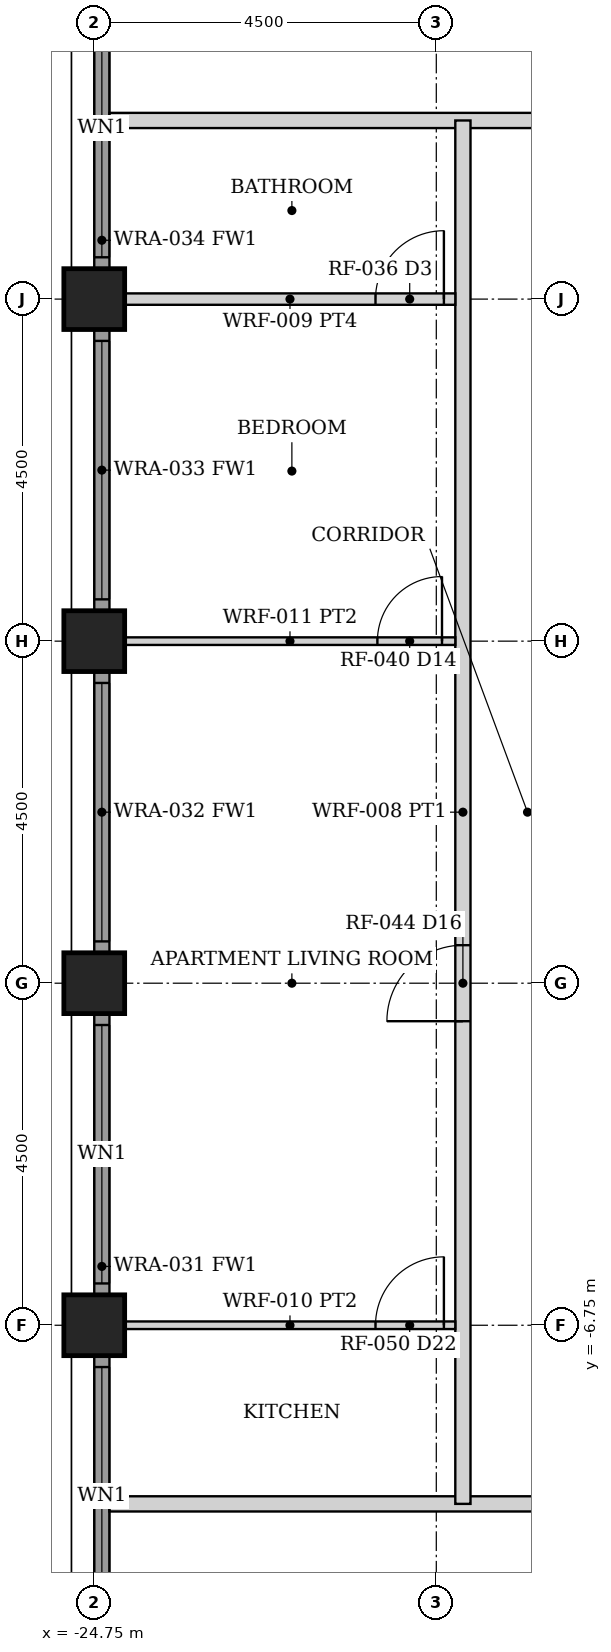
"""IFC4 building model, lengths in metres.
Left out: names, types, materials, properties, quantities, classifications, styles, units other than length and angle.
Written with IfcOpenShell. Run it as: python <this file> out.ifc"""

import sys

from ifc_helpers import new_model, si_unit, direction, frame, frame_2d, origin, origin_2d, place, context, subcontext, project, spatial, rectangle, hollow_rectangle, extrude, element, fill, save


model = new_model("IFC4")
c1 = context("Model", 3, precision=1e-05, world=origin(), true_north=direction((0.0, 1.0)))
c2 = subcontext(c1, "Body", "Model", "MODEL_VIEW")
j1 = project(units=[si_unit("LENGTHUNIT", "METRE"), si_unit("PLANEANGLEUNIT", "RADIAN")], contexts=[c1])
p1 = place(None, origin())
s1 = spatial("IfcSite", under=j1, at=p1, CompositionType="ELEMENT")
p2 = place(p1, origin())
s2 = spatial("IfcBuilding", under=s1, at=p2, CompositionType="ELEMENT")
p3 = place(p2, frame((0.0, 0.0, 79.0)))
s3 = spatial("IfcBuildingStorey", under=s2, at=p3, CompositionType="ELEMENT", Elevation=79.0)
for number, where, z_axis, x_axis in (
    (1, (-24.75, -6.75, 0.0), (0.0, 0.0, 1.0), (1.0, 0.0, 0.0)),
    (2, (-24.75, -2.25, 0.0), (0.0, 0.0, 1.0), (1.0, 0.0, 0.0)),
    (3, (-24.75, 2.25, 0.0), (0.0, 0.0, 1.0), (1.0, 0.0, 0.0)),
    (4, (-24.75, 6.75, 0.0), (0.0, 0.0, 1.0), (1.0, 0.0, 0.0)),
):
    element("IfcColumn", number, at=place(p3, frame(where, z_axis=z_axis, x_axis=x_axis)), inside=s3, PredefinedType="COLUMN", context=c2, shape_type="SweptSolid", body=[
        extrude(hollow_rectangle(XDim=0.8, YDim=0.8, WallThickness=0.06, at=origin_2d()), origin(), (0.0, 0.0, 1.0), 3.5),
    ])
p4 = place(p3, frame((-24.65, -10.845, 0.0), z_axis=(0.0, 0.0, 1.0), x_axis=(0.0, 1.0, 0.0)))
e5 = element("IfcWall", 5, at=p4, inside=s3, PredefinedType="SOLIDWALL", context=c2, shape_type="SweptSolid", body=[
    extrude(rectangle(XDim=3.69, YDim=0.2, at=frame_2d((1.845, 0.0))), origin(), (0.0, 0.0, 1.0), 2.379),
])
p5 = place(p4, frame((0.145, 0.0, 0.3)))
e6 = element("IfcOpeningElement", 6, at=p5, cuts=e5, PredefinedType="OPENING", context=c2, shape_type="SweptSolid", body=[
    extrude(rectangle(XDim=3.4, YDim=1.929, at=frame_2d((1.7, 0.964))), frame((0.0, 0.11, 0.0), z_axis=(0.0, -1.0, 0.0), x_axis=(1.0, 0.0, 0.0)), (0.0, 0.0, 1.0), 0.22),
])
p6 = place(p3, frame((-24.65, -6.345, 0.0), z_axis=(0.0, 0.0, 1.0), x_axis=(0.0, 1.0, 0.0)))
e7 = element("IfcWall", 7, at=p6, inside=s3, PredefinedType="SOLIDWALL", context=c2, shape_type="SweptSolid", body=[
    extrude(rectangle(XDim=3.69, YDim=0.2, at=frame_2d((1.845, 0.0))), origin(), (0.0, 0.0, 1.0), 2.379),
])
p7 = place(p6, frame((0.145, 0.0, 0.3)))
e8 = element("IfcOpeningElement", 8, at=p7, cuts=e7, PredefinedType="OPENING", context=c2, shape_type="SweptSolid", body=[
    extrude(rectangle(XDim=3.4, YDim=1.929, at=frame_2d((1.7, 0.964))), frame((0.0, 0.11, 0.0), z_axis=(0.0, -1.0, 0.0), x_axis=(1.0, 0.0, 0.0)), (0.0, 0.0, 1.0), 0.22),
])
p8 = place(p3, frame((-24.65, -1.845, 0.0), z_axis=(0.0, 0.0, 1.0), x_axis=(0.0, 1.0, 0.0)))
e9 = element("IfcWall", 9, at=p8, inside=s3, PredefinedType="SOLIDWALL", context=c2, shape_type="SweptSolid", body=[
    extrude(rectangle(XDim=3.69, YDim=0.2, at=frame_2d((1.845, 0.0))), origin(), (0.0, 0.0, 1.0), 2.379),
])
p9 = place(p8, frame((0.145, 0.0, 0.3)))
e10 = element("IfcOpeningElement", 10, at=p9, cuts=e9, PredefinedType="OPENING", context=c2, shape_type="SweptSolid", body=[
    extrude(rectangle(XDim=3.4, YDim=1.929, at=frame_2d((1.7, 0.964))), frame((0.0, 0.11, 0.0), z_axis=(0.0, -1.0, 0.0), x_axis=(1.0, 0.0, 0.0)), (0.0, 0.0, 1.0), 0.22),
])
p10 = place(p3, frame((-24.65, 2.655, 0.0), z_axis=(0.0, 0.0, 1.0), x_axis=(0.0, 1.0, 0.0)))
e11 = element("IfcWall", 11, at=p10, inside=s3, PredefinedType="SOLIDWALL", context=c2, shape_type="SweptSolid", body=[
    extrude(rectangle(XDim=3.69, YDim=0.2, at=frame_2d((1.845, 0.0))), origin(), (0.0, 0.0, 1.0), 2.379),
])
p11 = place(p10, frame((0.145, 0.0, 0.3)))
e12 = element("IfcOpeningElement", 12, at=p11, cuts=e11, PredefinedType="OPENING", context=c2, shape_type="SweptSolid", body=[
    extrude(rectangle(XDim=3.4, YDim=1.929, at=frame_2d((1.7, 0.964))), frame((0.0, 0.11, 0.0), z_axis=(0.0, -1.0, 0.0), x_axis=(1.0, 0.0, 0.0)), (0.0, 0.0, 1.0), 0.22),
])
p12 = place(p3, frame((-24.65, 7.155, 0.0), z_axis=(0.0, 0.0, 1.0), x_axis=(0.0, 1.0, 0.0)))
e13 = element("IfcWall", 13, at=p12, inside=s3, PredefinedType="SOLIDWALL", context=c2, shape_type="SweptSolid", body=[
    extrude(rectangle(XDim=3.69, YDim=0.2, at=frame_2d((1.845, 0.0))), origin(), (0.0, 0.0, 1.0), 2.379),
])
p13 = place(p12, frame((0.145, 0.0, 0.3)))
e14 = element("IfcOpeningElement", 14, at=p13, cuts=e13, PredefinedType="OPENING", context=c2, shape_type="SweptSolid", body=[
    extrude(rectangle(XDim=3.4, YDim=1.929, at=frame_2d((1.7, 0.964))), frame((0.0, 0.11, 0.0), z_axis=(0.0, -1.0, 0.0), x_axis=(1.0, 0.0, 0.0)), (0.0, 0.0, 1.0), 0.22),
])
p14 = place(p3, frame((-24.55, 9.1, 0.0), z_axis=(0.0, 0.0, 1.0), x_axis=(1.0, 0.0, 0.0)))
e15 = element("IfcWall", 15, at=p14, inside=s3, PredefinedType="PARTITIONING", context=c2, shape_type="SweptSolid", body=[
    extrude(rectangle(XDim=49.1, YDim=0.2, at=frame_2d((24.55, 0.0))), origin(), (0.0, 0.0, 1.0), 2.373),
])
p15 = place(p14, frame((22.55, 0.0, 0.0)))
e16 = element("IfcOpeningElement", 16, at=p15, cuts=e15, PredefinedType="OPENING", context=c2, shape_type="SweptSolid", body=[
    extrude(rectangle(XDim=1.0, YDim=2.3, at=frame_2d((0.5, 1.15))), frame((0.0, 0.11, 0.0), z_axis=(0.0, -1.0, 0.0), x_axis=(1.0, 0.0, 0.0)), (0.0, 0.0, 1.0), 0.22),
])
p16 = place(p14, frame((21.05, 0.0, 0.0)))
e17 = element("IfcOpeningElement", 17, at=p16, cuts=e15, PredefinedType="OPENING", context=c2, shape_type="SweptSolid", body=[
    extrude(rectangle(XDim=1.0, YDim=2.3, at=frame_2d((0.5, 1.15))), frame((0.0, 0.11, 0.0), z_axis=(0.0, -1.0, 0.0), x_axis=(1.0, 0.0, 0.0)), (0.0, 0.0, 1.0), 0.22),
])
p17 = place(p3, frame((-24.55, -9.1, 0.0), z_axis=(0.0, 0.0, 1.0), x_axis=(1.0, 0.0, 0.0)))
e18 = element("IfcWall", 18, at=p17, inside=s3, PredefinedType="PARTITIONING", context=c2, shape_type="SweptSolid", body=[
    extrude(rectangle(XDim=49.1, YDim=0.2, at=frame_2d((24.55, 0.0))), origin(), (0.0, 0.0, 1.0), 2.373),
])
p18 = place(p17, frame((25.55, 0.0, 0.0)))
e19 = element("IfcOpeningElement", 19, at=p18, cuts=e18, PredefinedType="OPENING", context=c2, shape_type="SweptSolid", body=[
    extrude(rectangle(XDim=1.0, YDim=2.3, at=frame_2d((0.5, 1.15))), frame((0.0, 0.11, 0.0), z_axis=(0.0, -1.0, 0.0), x_axis=(1.0, 0.0, 0.0)), (0.0, 0.0, 1.0), 0.22),
])
p19 = place(p17, frame((27.05, 0.0, 0.0)))
e20 = element("IfcOpeningElement", 20, at=p19, cuts=e18, PredefinedType="OPENING", context=c2, shape_type="SweptSolid", body=[
    extrude(rectangle(XDim=1.0, YDim=2.3, at=frame_2d((0.5, 1.15))), frame((0.0, 0.11, 0.0), z_axis=(0.0, -1.0, 0.0), x_axis=(1.0, 0.0, 0.0)), (0.0, 0.0, 1.0), 0.22),
])
p20 = place(p3, frame((-19.9, -9.1, 0.0), z_axis=(0.0, 0.0, 1.0), x_axis=(0.0, 1.0, 0.0)))
e21 = element("IfcWall", 21, at=p20, inside=s3, PredefinedType="PARTITIONING", context=c2, shape_type="SweptSolid", body=[
    extrude(rectangle(XDim=18.2, YDim=0.2, at=frame_2d((9.1, 0.0))), origin(), (0.0, 0.0, 1.0), 2.373),
])
p21 = place(p20, frame((6.35, 0.0, 0.0)))
e22 = element("IfcOpeningElement", 22, at=p21, cuts=e21, PredefinedType="OPENING", context=c2, shape_type="SweptSolid", body=[
    extrude(rectangle(XDim=1.0, YDim=2.3, at=frame_2d((0.5, 1.15))), frame((0.0, 0.11, 0.0), z_axis=(0.0, -1.0, 0.0), x_axis=(1.0, 0.0, 0.0)), (0.0, 0.0, 1.0), 0.22),
])
p22 = place(p3, frame((-24.35, -6.75, 0.0), z_axis=(0.0, 0.0, 1.0), x_axis=(1.0, 0.0, 0.0)))
e23 = element("IfcWall", 23, at=p22, inside=s3, PredefinedType="PARTITIONING", context=c2, shape_type="SweptSolid", body=[
    extrude(rectangle(XDim=4.35, YDim=0.1, at=frame_2d((2.175, 0.0))), origin(), (0.0, 0.0, 1.0), 2.373),
])
p23 = place(p22, frame((3.3, 0.0, 0.0)))
e24 = element("IfcOpeningElement", 24, at=p23, cuts=e23, PredefinedType="OPENING", context=c2, shape_type="SweptSolid", body=[
    extrude(rectangle(XDim=0.9, YDim=2.1, at=frame_2d((0.45, 1.05))), frame((0.0, 0.06, 0.0), z_axis=(0.0, -1.0, 0.0), x_axis=(1.0, 0.0, 0.0)), (0.0, 0.0, 1.0), 0.12),
])
p24 = place(p3, frame((-24.35, 2.25, 0.0), z_axis=(0.0, 0.0, 1.0), x_axis=(1.0, 0.0, 0.0)))
e25 = element("IfcWall", 25, at=p24, inside=s3, PredefinedType="PARTITIONING", context=c2, shape_type="SweptSolid", body=[
    extrude(rectangle(XDim=4.35, YDim=0.1, at=frame_2d((2.175, 0.0))), origin(), (0.0, 0.0, 1.0), 2.373),
])
p25 = place(p24, frame((3.325, 0.0, 0.0)))
e26 = element("IfcOpeningElement", 26, at=p25, cuts=e25, PredefinedType="OPENING", context=c2, shape_type="SweptSolid", body=[
    extrude(rectangle(XDim=0.85, YDim=2.1, at=frame_2d((0.425, 1.05))), frame((0.0, 0.06, 0.0), z_axis=(0.0, -1.0, 0.0), x_axis=(1.0, 0.0, 0.0)), (0.0, 0.0, 1.0), 0.12),
])
p26 = place(p3, frame((-24.35, 6.75, 0.0), z_axis=(0.0, 0.0, 1.0), x_axis=(1.0, 0.0, 0.0)))
e27 = element("IfcWall", 27, at=p26, inside=s3, PredefinedType="PARTITIONING", context=c2, shape_type="SweptSolid", body=[
    extrude(rectangle(XDim=4.35, YDim=0.15, at=frame_2d((2.175, 0.0))), origin(), (0.0, 0.0, 1.0), 2.373),
])
p27 = place(p26, frame((3.3, 0.0, 0.0)))
e28 = element("IfcOpeningElement", 28, at=p27, cuts=e27, PredefinedType="OPENING", context=c2, shape_type="SweptSolid", body=[
    extrude(rectangle(XDim=0.9, YDim=2.1, at=frame_2d((0.45, 1.05))), frame((0.0, 0.085, 0.0), z_axis=(0.0, -1.0, 0.0), x_axis=(1.0, 0.0, 0.0)), (0.0, 0.0, 1.0), 0.17),
])
p28 = place(p5, origin())
e29 = element("IfcWindow", 29, at=p28, inside=s3, PartitioningType="SINGLE_PANEL", PredefinedType="WINDOW", context=c2, shape_type="SweptSolid", body=[
    extrude(rectangle(XDim=3.4, YDim=1.929, at=frame_2d((1.7, 0.964))), frame((0.0, 0.03, 0.0), z_axis=(0.0, -1.0, 0.0), x_axis=(1.0, 0.0, 0.0)), (0.0, 0.0, 1.0), 0.06),
])
fill(e6, e29)
p29 = place(p7, origin())
e30 = element("IfcWindow", 30, at=p29, inside=s3, PartitioningType="SINGLE_PANEL", PredefinedType="WINDOW", context=c2, shape_type="SweptSolid", body=[
    extrude(rectangle(XDim=3.4, YDim=1.929, at=frame_2d((1.7, 0.964))), frame((0.0, 0.03, 0.0), z_axis=(0.0, -1.0, 0.0), x_axis=(1.0, 0.0, 0.0)), (0.0, 0.0, 1.0), 0.06),
])
fill(e8, e30)
p30 = place(p9, origin())
e31 = element("IfcWindow", 31, at=p30, inside=s3, PartitioningType="SINGLE_PANEL", PredefinedType="WINDOW", context=c2, shape_type="SweptSolid", body=[
    extrude(rectangle(XDim=3.4, YDim=1.929, at=frame_2d((1.7, 0.964))), frame((0.0, 0.03, 0.0), z_axis=(0.0, -1.0, 0.0), x_axis=(1.0, 0.0, 0.0)), (0.0, 0.0, 1.0), 0.06),
])
fill(e10, e31)
p31 = place(p11, origin())
e32 = element("IfcWindow", 32, at=p31, inside=s3, PartitioningType="SINGLE_PANEL", PredefinedType="WINDOW", context=c2, shape_type="SweptSolid", body=[
    extrude(rectangle(XDim=3.4, YDim=1.929, at=frame_2d((1.7, 0.964))), frame((0.0, 0.03, 0.0), z_axis=(0.0, -1.0, 0.0), x_axis=(1.0, 0.0, 0.0)), (0.0, 0.0, 1.0), 0.06),
])
fill(e12, e32)
p32 = place(p13, origin())
e33 = element("IfcWindow", 33, at=p32, inside=s3, PartitioningType="SINGLE_PANEL", PredefinedType="WINDOW", context=c2, shape_type="SweptSolid", body=[
    extrude(rectangle(XDim=3.4, YDim=1.929, at=frame_2d((1.7, 0.964))), frame((0.0, 0.03, 0.0), z_axis=(0.0, -1.0, 0.0), x_axis=(1.0, 0.0, 0.0)), (0.0, 0.0, 1.0), 0.06),
])
fill(e14, e33)
p33 = place(p23, origin())
e34 = element("IfcDoor", 34, at=p33, inside=s3, OperationType="SINGLE_SWING_RIGHT", PredefinedType="DOOR", context=c2, shape_type="SweptSolid", body=[
    extrude(rectangle(XDim=0.9, YDim=2.1, at=frame_2d((0.45, 1.05))), frame((0.0, 0.025, 0.0), z_axis=(0.0, -1.0, 0.0), x_axis=(1.0, 0.0, 0.0)), (0.0, 0.0, 1.0), 0.05),
])
fill(e24, e34)
p34 = place(p25, origin())
e35 = element("IfcDoor", 35, at=p34, inside=s3, OperationType="SINGLE_SWING_RIGHT", PredefinedType="DOOR", context=c2, shape_type="SweptSolid", body=[
    extrude(rectangle(XDim=0.85, YDim=2.1, at=frame_2d((0.425, 1.05))), frame((0.0, 0.025, 0.0), z_axis=(0.0, -1.0, 0.0), x_axis=(1.0, 0.0, 0.0)), (0.0, 0.0, 1.0), 0.05),
])
fill(e26, e35)
p35 = place(p27, origin())
e36 = element("IfcDoor", 36, at=p35, inside=s3, OperationType="SINGLE_SWING_RIGHT", PredefinedType="DOOR", context=c2, shape_type="SweptSolid", body=[
    extrude(rectangle(XDim=0.9, YDim=2.1, at=frame_2d((0.45, 1.05))), frame((0.0, 0.025, 0.0), z_axis=(0.0, -1.0, 0.0), x_axis=(1.0, 0.0, 0.0)), (0.0, 0.0, 1.0), 0.05),
])
fill(e28, e36)
p36 = place(p21, origin())
e37 = element("IfcDoor", 37, at=p36, inside=s3, OperationType="SINGLE_SWING_LEFT", PredefinedType="DOOR", context=c2, shape_type="SweptSolid", body=[
    extrude(rectangle(XDim=1.0, YDim=2.3, at=frame_2d((0.5, 1.15))), frame((0.0, 0.025, 0.0), z_axis=(0.0, -1.0, 0.0), x_axis=(1.0, 0.0, 0.0)), (0.0, 0.0, 1.0), 0.05),
])
fill(e22, e37)
save(model, sys.argv[1])
